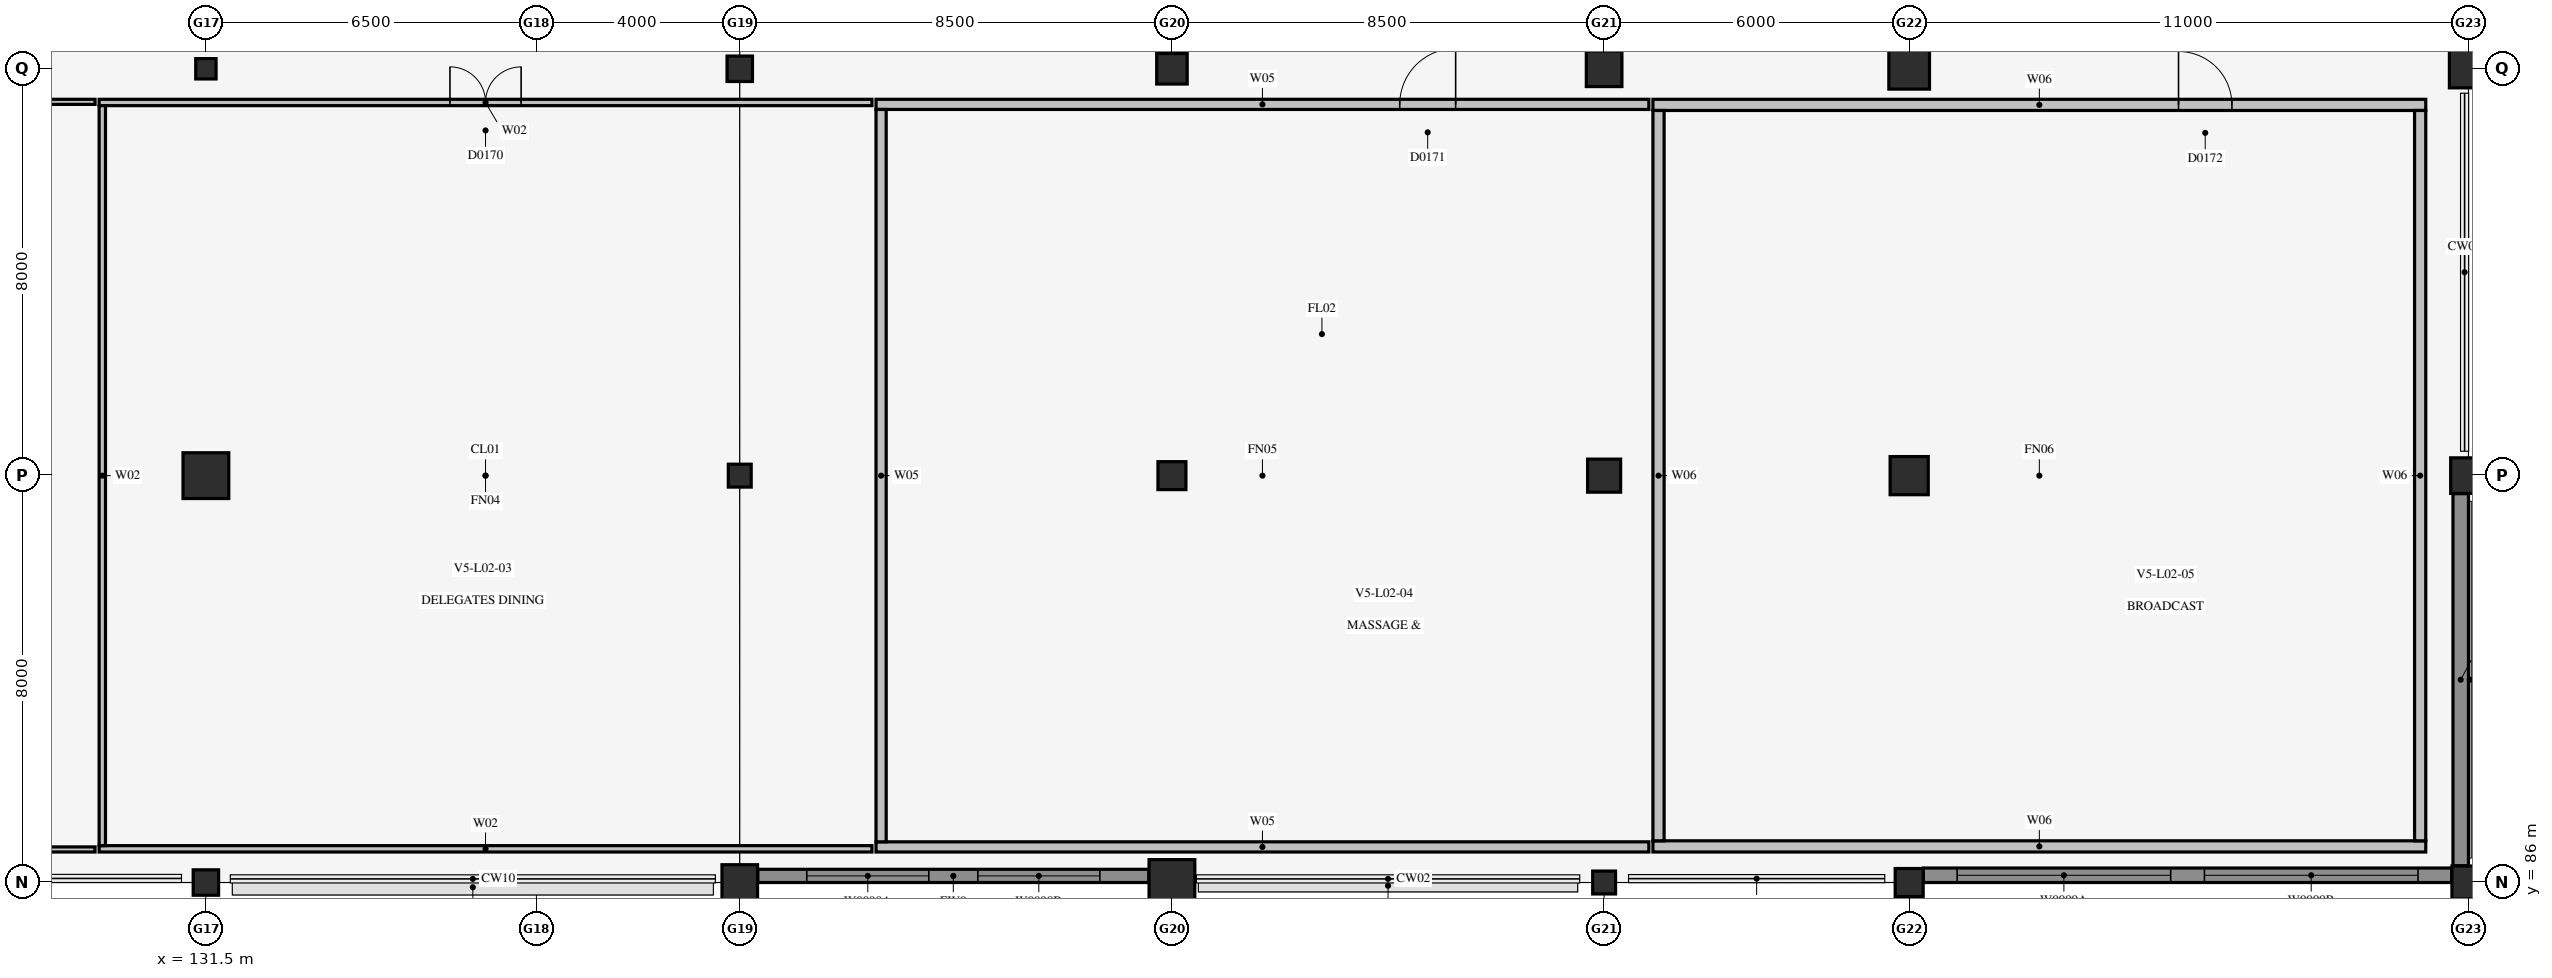
"""IFC4 building model, lengths in metres.
Left out: names, types, materials, properties, quantities, classifications, styles, units other than length and angle.
Written with IfcOpenShell. Run it as: python <this file> out.ifc"""

import sys

from ifc_helpers import new_model, si_unit, direction, frame, frame_2d, origin, origin_2d, place, context, subcontext, project, spatial, rectangle, circle, extrude, element, fill, save


model = new_model("IFC4")
c1 = context("Model", 3, precision=1e-05, world=origin(), true_north=direction((0.0, 1.0)))
c2 = subcontext(c1, "Body", "Model", "MODEL_VIEW")
j1 = project(units=[si_unit("LENGTHUNIT", "METRE"), si_unit("PLANEANGLEUNIT", "RADIAN")], contexts=[c1])
p1 = place(None, origin())
s1 = spatial("IfcSite", under=j1, at=p1, CompositionType="ELEMENT")
p2 = place(p1, origin())
s2 = spatial("IfcBuilding", under=s1, at=p2, CompositionType="ELEMENT")
p3 = place(p2, frame((0.0, 0.0, 10.2)))
s3 = spatial("IfcBuildingStorey", under=s2, at=p3, CompositionType="ELEMENT", Elevation=10.2)
p4 = place(p3, frame((131.5, 86.0, 0.0), z_axis=(0.0, 0.0, 1.0), x_axis=(1.0, 0.0, 0.0)))
e1 = element("IfcColumn", 1, at=p4, inside=s3, PredefinedType="COLUMN", context=c2, shape_type="SweptSolid", body=[
    extrude(circle(Radius=0.25, at=origin_2d()), origin(), (0.0, 0.0, 1.0), 4.3),
])
p5 = place(p3, frame((131.5, 94.0, 0.0), z_axis=(0.0, 0.0, 1.0), x_axis=(1.0, 0.0, 0.0)))
e2 = element("IfcColumn", 2, at=p5, inside=s3, PredefinedType="COLUMN", context=c2, shape_type="SweptSolid", body=[
    extrude(circle(Radius=0.45, at=origin_2d()), origin(), (0.0, 0.0, 1.0), 4.6),
])
p6 = place(p3, frame((131.5, 102.0, 0.0), z_axis=(0.0, 0.0, 1.0), x_axis=(1.0, 0.0, 0.0)))
e3 = element("IfcColumn", 3, at=p6, inside=s3, PredefinedType="COLUMN", context=c2, shape_type="SweptSolid", body=[
    extrude(rectangle(XDim=0.4, YDim=0.4, at=origin_2d()), origin(), (0.0, 0.0, 1.0), 4.6),
])
p7 = place(p3, frame((142.0, 86.0, 0.0), z_axis=(0.0, 0.0, 1.0), x_axis=(1.0, 0.0, 0.0)))
e4 = element("IfcColumn", 4, at=p7, inside=s3, PredefinedType="COLUMN", context=c2, shape_type="SweptSolid", body=[
    extrude(circle(Radius=0.35, at=origin_2d()), origin(), (0.0, 0.0, 1.0), 4.3),
])
p8 = place(p3, frame((142.0, 94.0, 0.0), z_axis=(0.0, 0.0, 1.0), x_axis=(1.0, 0.0, 0.0)))
e5 = element("IfcColumn", 5, at=p8, inside=s3, PredefinedType="COLUMN", context=c2, shape_type="SweptSolid", body=[
    extrude(rectangle(XDim=0.45, YDim=0.45, at=origin_2d()), origin(), (0.0, 0.0, 1.0), 4.6),
])
p9 = place(p3, frame((142.0, 102.0, 0.0), z_axis=(0.0, 0.0, 1.0), x_axis=(1.0, 0.0, 0.0)))
e6 = element("IfcColumn", 6, at=p9, inside=s3, PredefinedType="COLUMN", context=c2, shape_type="SweptSolid", body=[
    extrude(rectangle(XDim=0.5, YDim=0.5, at=origin_2d()), origin(), (0.0, 0.0, 1.0), 4.6),
])
p10 = place(p3, frame((150.5, 86.0, 0.0), z_axis=(0.0, 0.0, 1.0), x_axis=(1.0, 0.0, 0.0)))
e7 = element("IfcColumn", 7, at=p10, inside=s3, PredefinedType="COLUMN", context=c2, shape_type="SweptSolid", body=[
    extrude(circle(Radius=0.45, at=origin_2d()), origin(), (0.0, 0.0, 1.0), 4.3),
])
p11 = place(p3, frame((150.5, 94.0, 0.0), z_axis=(0.0, 0.0, 1.0), x_axis=(1.0, 0.0, 0.0)))
e8 = element("IfcColumn", 8, at=p11, inside=s3, PredefinedType="COLUMN", context=c2, shape_type="SweptSolid", body=[
    extrude(rectangle(XDim=0.55, YDim=0.55, at=origin_2d()), origin(), (0.0, 0.0, 1.0), 4.6),
])
p12 = place(p3, frame((150.5, 102.0, 0.0), z_axis=(0.0, 0.0, 1.0), x_axis=(1.0, 0.0, 0.0)))
e9 = element("IfcColumn", 9, at=p12, inside=s3, PredefinedType="COLUMN", context=c2, shape_type="SweptSolid", body=[
    extrude(rectangle(XDim=0.6, YDim=0.6, at=origin_2d()), origin(), (0.0, 0.0, 1.0), 4.6),
])
p13 = place(p3, frame((159.0, 86.0, 0.0), z_axis=(0.0, 0.0, 1.0), x_axis=(1.0, 0.0, 0.0)))
e10 = element("IfcColumn", 10, at=p13, inside=s3, PredefinedType="COLUMN", context=c2, shape_type="SweptSolid", body=[
    extrude(rectangle(XDim=0.45, YDim=0.45, at=origin_2d()), origin(), (0.0, 0.0, 1.0), 4.3),
])
p14 = place(p3, frame((159.0, 94.0, 0.0), z_axis=(0.0, 0.0, 1.0), x_axis=(1.0, 0.0, 0.0)))
e11 = element("IfcColumn", 11, at=p14, inside=s3, PredefinedType="COLUMN", context=c2, shape_type="SweptSolid", body=[
    extrude(rectangle(XDim=0.65, YDim=0.65, at=origin_2d()), origin(), (0.0, 0.0, 1.0), 4.6),
])
p15 = place(p3, frame((159.0, 102.0, 0.0), z_axis=(0.0, 0.0, 1.0), x_axis=(1.0, 0.0, 0.0)))
e12 = element("IfcColumn", 12, at=p15, inside=s3, PredefinedType="COLUMN", context=c2, shape_type="SweptSolid", body=[
    extrude(rectangle(XDim=0.7, YDim=0.7, at=origin_2d()), origin(), (0.0, 0.0, 1.0), 4.6),
])
p16 = place(p3, frame((165.0, 86.0, 0.0), z_axis=(0.0, 0.0, 1.0), x_axis=(1.0, 0.0, 0.0)))
e13 = element("IfcColumn", 13, at=p16, inside=s3, PredefinedType="COLUMN", context=c2, shape_type="SweptSolid", body=[
    extrude(rectangle(XDim=0.55, YDim=0.55, at=origin_2d()), origin(), (0.0, 0.0, 1.0), 4.3),
])
p17 = place(p3, frame((165.0, 94.0, 0.0), z_axis=(0.0, 0.0, 1.0), x_axis=(1.0, 0.0, 0.0)))
e14 = element("IfcColumn", 14, at=p17, inside=s3, PredefinedType="COLUMN", context=c2, shape_type="SweptSolid", body=[
    extrude(rectangle(XDim=0.75, YDim=0.75, at=origin_2d()), origin(), (0.0, 0.0, 1.0), 4.6),
])
p18 = place(p3, frame((165.0, 102.0, 0.0), z_axis=(0.0, 0.0, 1.0), x_axis=(1.0, 0.0, 0.0)))
e15 = element("IfcColumn", 15, at=p18, inside=s3, PredefinedType="COLUMN", context=c2, shape_type="SweptSolid", body=[
    extrude(rectangle(XDim=0.8, YDim=0.8, at=origin_2d()), origin(), (0.0, 0.0, 1.0), 4.6),
])
p19 = place(p3, frame((176.0, 86.0, 0.0), z_axis=(0.0, 0.0, 1.0), x_axis=(1.0, 0.0, 0.0)))
e16 = element("IfcColumn", 16, at=p19, inside=s3, PredefinedType="COLUMN", context=c2, shape_type="SweptSolid", body=[
    extrude(rectangle(XDim=0.65, YDim=0.65, at=origin_2d()), origin(), (0.0, 0.0, 1.0), 4.3),
])
p20 = place(p3, frame((176.0, 94.0, 0.0), z_axis=(0.0, 0.0, 1.0), x_axis=(1.0, 0.0, 0.0)))
e17 = element("IfcColumn", 17, at=p20, inside=s3, PredefinedType="COLUMN", context=c2, shape_type="SweptSolid", body=[
    extrude(rectangle(XDim=0.7, YDim=0.7, at=origin_2d()), origin(), (0.0, 0.0, 1.0), 4.6),
])
p21 = place(p3, frame((176.0, 102.0, 0.0), z_axis=(0.0, 0.0, 1.0), x_axis=(1.0, 0.0, 0.0)))
e18 = element("IfcColumn", 18, at=p21, inside=s3, PredefinedType="COLUMN", context=c2, shape_type="SweptSolid", body=[
    extrude(rectangle(XDim=0.75, YDim=0.75, at=origin_2d()), origin(), (0.0, 0.0, 1.0), 4.6),
])
p22 = place(p3, frame((114.12, 86.65, 0.0), z_axis=(0.0, 0.0, 1.0), x_axis=(1.0, 0.0, 0.0)))
e19 = element("IfcWall", 19, at=p22, inside=s3, PredefinedType="PARTITIONING", context=c2, shape_type="SweptSolid", body=[
    extrude(rectangle(XDim=15.2, YDim=0.1, at=frame_2d((7.6, 0.0))), origin(), (0.0, 0.0, 1.0), 4.285),
])
p23 = place(p3, frame((114.12, 101.35, 0.0), z_axis=(0.0, 0.0, 1.0), x_axis=(1.0, 0.0, 0.0)))
e20 = element("IfcWall", 20, at=p23, inside=s3, PredefinedType="PARTITIONING", context=c2, shape_type="SweptSolid", body=[
    extrude(rectangle(XDim=15.2, YDim=0.1, at=frame_2d((7.6, 0.0))), origin(), (0.0, 0.0, 1.0), 4.285),
])
p24 = place(p23, frame((5.547, 0.0, 0.0)))
e21 = element("IfcOpeningElement", 21, at=p24, cuts=e20, PredefinedType="OPENING", context=c2, shape_type="SweptSolid", body=[
    extrude(rectangle(XDim=0.95, YDim=2.15, at=frame_2d((0.475, 1.075))), frame((0.0, 0.062, 0.0), z_axis=(0.0, -1.0, 0.0), x_axis=(1.0, 0.0, 0.0)), (0.0, 0.0, 1.0), 0.124),
])
p25 = place(p3, frame((129.4, 86.663, 0.0), z_axis=(0.0, 0.0, 1.0), x_axis=(1.0, 0.0, 0.0)))
e22 = element("IfcWall", 22, at=p25, inside=s3, PredefinedType="PARTITIONING", context=c2, shape_type="SweptSolid", body=[
    extrude(rectangle(XDim=15.2, YDim=0.125, at=frame_2d((7.6, 0.0))), origin(), (0.0, 0.0, 1.0), 4.285),
])
p26 = place(p3, frame((129.4, 101.337, 0.0), z_axis=(0.0, 0.0, 1.0), x_axis=(1.0, 0.0, 0.0)))
e23 = element("IfcWall", 23, at=p26, inside=s3, PredefinedType="PARTITIONING", context=c2, shape_type="SweptSolid", body=[
    extrude(rectangle(XDim=15.2, YDim=0.125, at=frame_2d((7.6, 0.0))), origin(), (0.0, 0.0, 1.0), 4.285),
])
p27 = place(p26, frame((6.9, 0.0, 0.0)))
e24 = element("IfcOpeningElement", 24, at=p27, cuts=e23, PredefinedType="OPENING", context=c2, shape_type="SweptSolid", body=[
    extrude(rectangle(XDim=1.4, YDim=2.2, at=frame_2d((0.7, 1.1))), frame((0.0, 0.074, 0.0), z_axis=(0.0, -1.0, 0.0), x_axis=(1.0, 0.0, 0.0)), (0.0, 0.0, 1.0), 0.149),
])
p28 = place(p3, frame((129.462, 86.725, 0.0), z_axis=(0.0, 0.0, 1.0), x_axis=(0.0, 1.0, 0.0)))
e25 = element("IfcWall", 25, at=p28, inside=s3, PredefinedType="PARTITIONING", context=c2, shape_type="SweptSolid", body=[
    extrude(rectangle(XDim=14.55, YDim=0.125, at=frame_2d((7.275, 0.0))), origin(), (0.0, 0.0, 1.0), 3.86),
])
p29 = place(p3, frame((144.68, 86.7, 0.0), z_axis=(0.0, 0.0, 1.0), x_axis=(1.0, 0.0, 0.0)))
e26 = element("IfcWall", 26, at=p29, inside=s3, PredefinedType="PLUMBINGWALL", context=c2, shape_type="SweptSolid", body=[
    extrude(rectangle(XDim=15.2, YDim=0.2, at=frame_2d((7.6, 0.0))), origin(), (0.0, 0.0, 1.0), 4.285),
])
p30 = place(p3, frame((144.68, 101.3, 0.0), z_axis=(0.0, 0.0, 1.0), x_axis=(1.0, 0.0, 0.0)))
e27 = element("IfcWall", 27, at=p30, inside=s3, PredefinedType="PLUMBINGWALL", context=c2, shape_type="SweptSolid", body=[
    extrude(rectangle(XDim=15.2, YDim=0.2, at=frame_2d((7.6, 0.0))), origin(), (0.0, 0.0, 1.0), 4.285),
])
p31 = place(p30, frame((10.3, 0.0, 0.0)))
e28 = element("IfcOpeningElement", 28, at=p31, cuts=e27, PredefinedType="OPENING", context=c2, shape_type="SweptSolid", body=[
    extrude(rectangle(XDim=1.1, YDim=2.25, at=frame_2d((0.55, 1.125))), frame((0.0, 0.112, 0.0), z_axis=(0.0, -1.0, 0.0), x_axis=(1.0, 0.0, 0.0)), (0.0, 0.0, 1.0), 0.224),
])
p32 = place(p3, frame((144.78, 86.8, 0.0), z_axis=(0.0, 0.0, 1.0), x_axis=(0.0, 1.0, 0.0)))
e29 = element("IfcWall", 29, at=p32, inside=s3, PredefinedType="PLUMBINGWALL", context=c2, shape_type="SweptSolid", body=[
    extrude(rectangle(XDim=14.4, YDim=0.2, at=frame_2d((7.2, 0.0))), origin(), (0.0, 0.0, 1.0), 3.815),
])
p33 = place(p3, frame((159.96, 86.71, 0.0), z_axis=(0.0, 0.0, 1.0), x_axis=(1.0, 0.0, 0.0)))
e30 = element("IfcWall", 30, at=p33, inside=s3, PredefinedType="PLUMBINGWALL", context=c2, shape_type="SweptSolid", body=[
    extrude(rectangle(XDim=15.2, YDim=0.22, at=frame_2d((7.6, 0.0))), origin(), (0.0, 0.0, 1.0), 4.285),
])
p34 = place(p3, frame((159.96, 101.29, 0.0), z_axis=(0.0, 0.0, 1.0), x_axis=(1.0, 0.0, 0.0)))
e31 = element("IfcWall", 31, at=p34, inside=s3, PredefinedType="PLUMBINGWALL", context=c2, shape_type="SweptSolid", body=[
    extrude(rectangle(XDim=15.2, YDim=0.22, at=frame_2d((7.6, 0.0))), origin(), (0.0, 0.0, 1.0), 4.285),
])
p35 = place(p34, frame((10.337, 0.0, 0.0)))
e32 = element("IfcOpeningElement", 32, at=p35, cuts=e31, PredefinedType="OPENING", context=c2, shape_type="SweptSolid", body=[
    extrude(rectangle(XDim=1.05, YDim=2.15, at=frame_2d((0.525, 1.075))), frame((0.0, 0.122, 0.0), z_axis=(0.0, -1.0, 0.0), x_axis=(1.0, 0.0, 0.0)), (0.0, 0.0, 1.0), 0.244),
])
for number, where, z_axis, x_axis in (
    (33, (175.05, 86.82, 0.0), (0.0, 0.0, 1.0), (0.0, 1.0, 0.0)),
    (34, (160.07, 86.82, 0.0), (0.0, 0.0, 1.0), (0.0, 1.0, 0.0)),
):
    element("IfcWall", number, at=place(p3, frame(where, z_axis=z_axis, x_axis=x_axis)), inside=s3, PredefinedType="PLUMBINGWALL", context=c2, shape_type="SweptSolid", body=[
        extrude(rectangle(XDim=14.36, YDim=0.22, at=frame_2d((7.18, 0.0))), origin(), (0.0, 0.0, 1.0), 4.285),
    ])
p36 = place(p3, frame((142.354, 86.13, 0.0), z_axis=(0.0, 0.0, 1.0), x_axis=(1.0, 0.0, 0.0)))
e35 = element("IfcWall", 35, at=p36, inside=s3, PredefinedType="SOLIDWALL", context=c2, shape_type="SweptSolid", body=[
    extrude(rectangle(XDim=7.692, YDim=0.26, at=frame_2d((3.846, 0.0))), origin(), (0.0, 0.0, 1.0), 3.734),
])
p37 = place(p36, frame((0.964, 0.0, 0.95)))
e36 = element("IfcOpeningElement", 36, at=p37, cuts=e35, PredefinedType="OPENING", context=c2, shape_type="SweptSolid", body=[
    extrude(rectangle(XDim=2.4, YDim=2.1, at=frame_2d((1.2, 1.05))), frame((0.0, 0.142, 0.0), z_axis=(0.0, -1.0, 0.0), x_axis=(1.0, 0.0, 0.0)), (0.0, 0.0, 1.0), 0.284),
])
p38 = place(p36, frame((4.328, 0.0, 0.95)))
e37 = element("IfcOpeningElement", 37, at=p38, cuts=e35, PredefinedType="OPENING", context=c2, shape_type="SweptSolid", body=[
    extrude(rectangle(XDim=2.4, YDim=2.1, at=frame_2d((1.2, 1.05))), frame((0.0, 0.142, 0.0), z_axis=(0.0, -1.0, 0.0), x_axis=(1.0, 0.0, 0.0)), (0.0, 0.0, 1.0), 0.284),
])
p39 = place(p3, frame((165.279, 86.143, 0.0), z_axis=(0.0, 0.0, 1.0), x_axis=(1.0, 0.0, 0.0)))
e38 = element("IfcWall", 38, at=p39, inside=s3, PredefinedType="SOLIDWALL", context=c2, shape_type="SweptSolid", body=[
    extrude(rectangle(XDim=10.392, YDim=0.285, at=frame_2d((5.196, 0.0))), origin(), (0.0, 0.0, 1.0), 3.81),
])
p40 = place(p39, frame((0.664, 0.0, 0.95)))
e39 = element("IfcOpeningElement", 39, at=p40, cuts=e38, PredefinedType="OPENING", context=c2, shape_type="SweptSolid", body=[
    extrude(rectangle(XDim=4.2, YDim=2.1, at=frame_2d((2.1, 1.05))), frame((0.0, 0.154, 0.0), z_axis=(0.0, -1.0, 0.0), x_axis=(1.0, 0.0, 0.0)), (0.0, 0.0, 1.0), 0.309),
])
p41 = place(p39, frame((5.528, 0.0, 0.95)))
e40 = element("IfcOpeningElement", 40, at=p41, cuts=e38, PredefinedType="OPENING", context=c2, shape_type="SweptSolid", body=[
    extrude(rectangle(XDim=4.2, YDim=2.1, at=frame_2d((2.1, 1.05))), frame((0.0, 0.154, 0.0), z_axis=(0.0, -1.0, 0.0), x_axis=(1.0, 0.0, 0.0)), (0.0, 0.0, 1.0), 0.309),
])
p42 = place(p3, frame((175.847, 86.329, 0.0), z_axis=(0.0, 0.0, 1.0), x_axis=(0.0, 1.0, 0.0)))
e41 = element("IfcWall", 41, at=p42, inside=s3, PredefinedType="SOLIDWALL", context=c2, shape_type="SweptSolid", body=[
    extrude(rectangle(XDim=7.317, YDim=0.305, at=frame_2d((3.658, 0.0))), origin(), (0.0, 0.0, 1.0), 3.658),
])
p43 = place(p27, frame((1.4, 0.0, 0.0), z_axis=(0.0, 0.0, 1.0), x_axis=(-1.0, 0.0, 0.0)))
e42 = element("IfcDoor", 42, at=p43, inside=s3, OperationType="DOUBLE_DOOR_SINGLE_SWING", PredefinedType="DOOR", context=c2, shape_type="SweptSolid", body=[
    extrude(rectangle(XDim=1.4, YDim=2.2, at=frame_2d((0.7, 1.1))), frame((0.0, 0.025, 0.0), z_axis=(0.0, -1.0, 0.0), x_axis=(1.0, 0.0, 0.0)), (0.0, 0.0, 1.0), 0.05),
])
fill(e24, e42)
p44 = place(p31, frame((1.1, 0.0, 0.0), z_axis=(0.0, 0.0, 1.0), x_axis=(-1.0, 0.0, 0.0)))
e43 = element("IfcDoor", 43, at=p44, inside=s3, OperationType="SINGLE_SWING_RIGHT", PredefinedType="DOOR", context=c2, shape_type="SweptSolid", body=[
    extrude(rectangle(XDim=1.1, YDim=2.25, at=frame_2d((0.55, 1.125))), frame((0.0, 0.025, 0.0), z_axis=(0.0, -1.0, 0.0), x_axis=(1.0, 0.0, 0.0)), (0.0, 0.0, 1.0), 0.05),
])
fill(e28, e43)
p45 = place(p35, frame((1.05, 0.0, 0.0), z_axis=(0.0, 0.0, 1.0), x_axis=(-1.0, 0.0, 0.0)))
e44 = element("IfcDoor", 44, at=p45, inside=s3, OperationType="SINGLE_SWING_LEFT", PredefinedType="DOOR", context=c2, shape_type="SweptSolid", body=[
    extrude(rectangle(XDim=1.05, YDim=2.15, at=frame_2d((0.525, 1.075))), frame((0.0, 0.025, 0.0), z_axis=(0.0, -1.0, 0.0), x_axis=(1.0, 0.0, 0.0)), (0.0, 0.0, 1.0), 0.05),
])
fill(e32, e44)
p46 = place(p37, origin())
e45 = element("IfcWindow", 45, at=p46, inside=s3, PartitioningType="SINGLE_PANEL", PredefinedType="WINDOW", context=c2, shape_type="SweptSolid", body=[
    extrude(rectangle(XDim=2.4, YDim=2.1, at=frame_2d((1.2, 1.05))), frame((0.0, 0.03, 0.0), z_axis=(0.0, -1.0, 0.0), x_axis=(1.0, 0.0, 0.0)), (0.0, 0.0, 1.0), 0.06),
])
fill(e36, e45)
p47 = place(p38, origin())
e46 = element("IfcWindow", 46, at=p47, inside=s3, PartitioningType="SINGLE_PANEL", PredefinedType="WINDOW", context=c2, shape_type="SweptSolid", body=[
    extrude(rectangle(XDim=2.4, YDim=2.1, at=frame_2d((1.2, 1.05))), frame((0.0, 0.03, 0.0), z_axis=(0.0, -1.0, 0.0), x_axis=(1.0, 0.0, 0.0)), (0.0, 0.0, 1.0), 0.06),
])
fill(e37, e46)
p48 = place(p40, origin())
e47 = element("IfcWindow", 47, at=p48, inside=s3, PartitioningType="SINGLE_PANEL", PredefinedType="WINDOW", context=c2, shape_type="SweptSolid", body=[
    extrude(rectangle(XDim=4.2, YDim=2.1, at=frame_2d((2.1, 1.05))), frame((0.0, 0.03, 0.0), z_axis=(0.0, -1.0, 0.0), x_axis=(1.0, 0.0, 0.0)), (0.0, 0.0, 1.0), 0.06),
])
fill(e39, e47)
p49 = place(p41, origin())
e48 = element("IfcWindow", 48, at=p49, inside=s3, PartitioningType="SINGLE_PANEL", PredefinedType="WINDOW", context=c2, shape_type="SweptSolid", body=[
    extrude(rectangle(XDim=4.2, YDim=2.1, at=frame_2d((2.1, 1.05))), frame((0.0, 0.03, 0.0), z_axis=(0.0, -1.0, 0.0), x_axis=(1.0, 0.0, 0.0)), (0.0, 0.0, 1.0), 0.06),
])
fill(e40, e48)
save(model, sys.argv[1])
